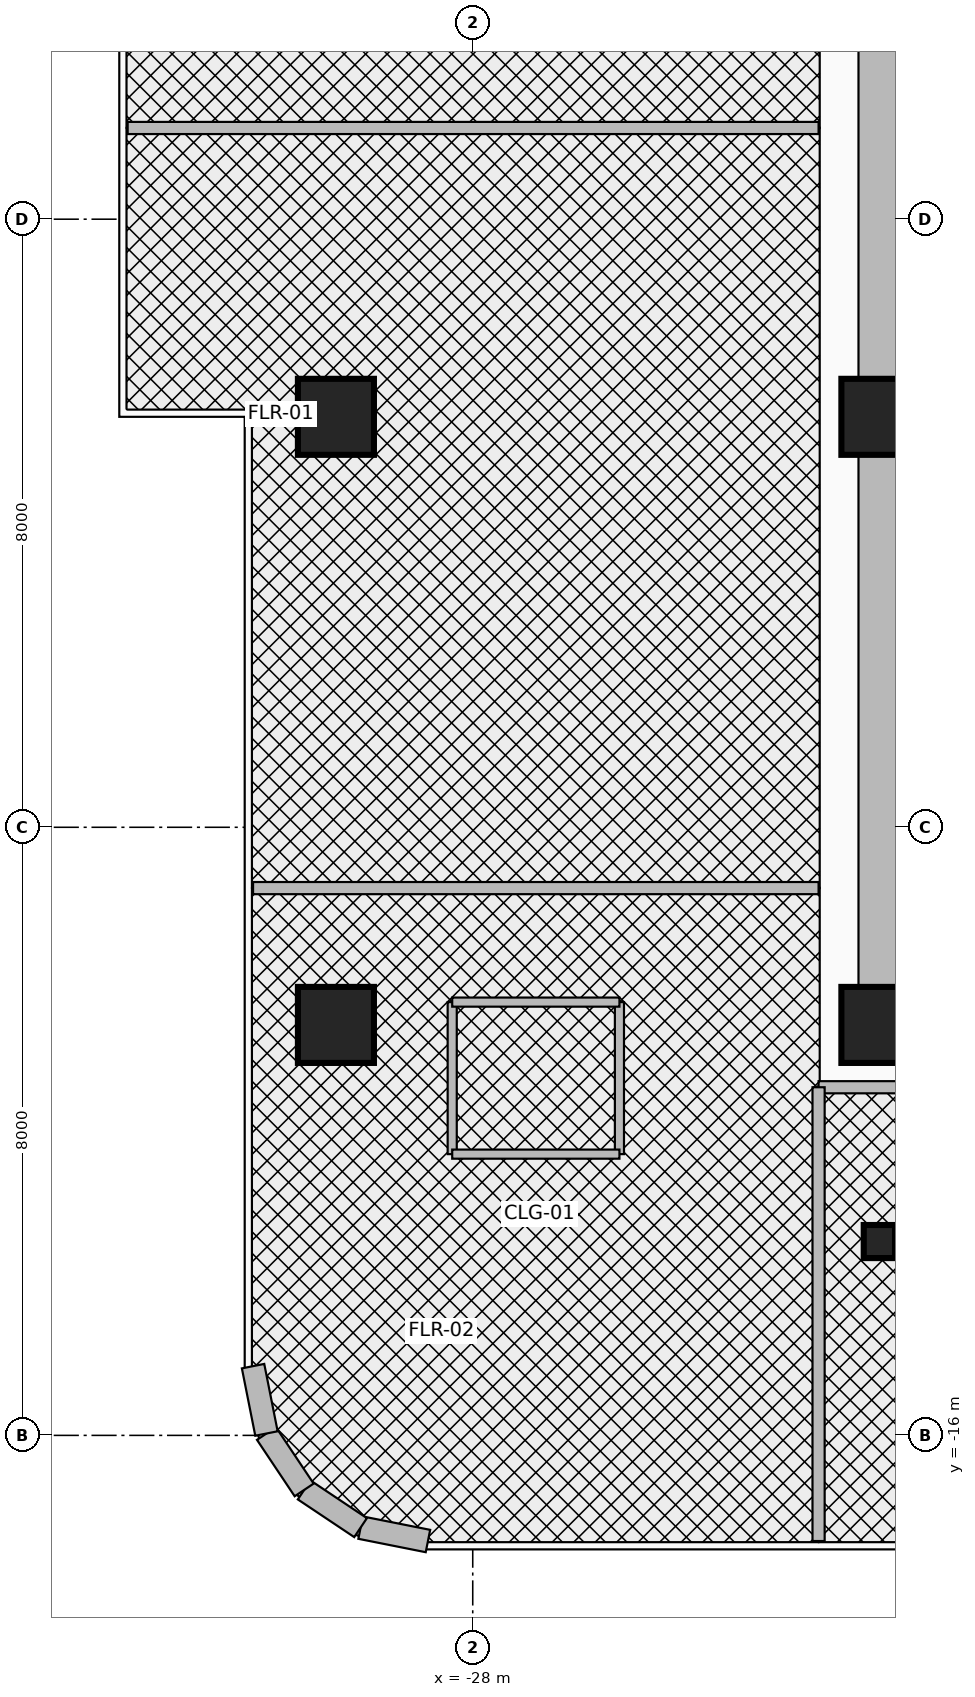
"""IFC4 building model, lengths in metres.
Left out: names, types, materials, properties, quantities, classifications, styles, units other than length and angle.
Written with IfcOpenShell. Run it as: python <this file> out.ifc"""

import sys

from ifc_helpers import new_model, si_unit, direction, frame, frame_2d, origin, origin_2d, place, context, subcontext, project, spatial, rectangle, i_section, extrude, source, transform, mapped, element, fill, save


model = new_model("IFC4")
c1 = context("Model", 3, precision=1e-05, world=origin(), true_north=direction((0.0, 1.0)))
c2 = subcontext(c1, "Body", "Model", "MODEL_VIEW")
j1 = project(units=[si_unit("LENGTHUNIT", "METRE"), si_unit("PLANEANGLEUNIT", "RADIAN")], contexts=[c1])
p1 = place(None, origin())
s1 = spatial("IfcSite", under=j1, at=p1, CompositionType="ELEMENT")
p2 = place(p1, origin())
s2 = spatial("IfcBuilding", under=s1, at=p2, CompositionType="ELEMENT")
p3 = place(p2, frame((0.0, 0.0, 172.3)))
s3 = spatial("IfcBuildingStorey", under=s2, at=p3, CompositionType="ELEMENT", Elevation=172.3)
p4 = place(p3, frame((-22.65, -11.075, 0.0), z_axis=(0.0, 0.0, 1.0), x_axis=(0.0, 1.0, 0.0)))
e1 = element("IfcWall", 1, at=p4, inside=s3, PredefinedType="SHEAR", context=c2, shape_type="SweptSolid", body=[
    extrude(rectangle(XDim=22.15, YDim=0.55, at=frame_2d((11.075, 0.0))), origin(), (0.0, 0.0, 1.0), 3.93),
])
p5 = place(p3, frame((-22.65, -10.8, 0.0), z_axis=(0.0, 0.0, 1.0), x_axis=(1.0, 0.0, 0.0)))
e2 = element("IfcWall", 2, at=p5, inside=s3, PredefinedType="SHEAR", context=c2, shape_type="SweptSolid", body=[
    extrude(rectangle(XDim=10.25, YDim=0.55, at=frame_2d((5.125, 0.0))), origin(), (0.0, 0.0, 1.0), 3.93),
])
m1 = source(origin(), c2, "Body", "SweptSolid", [
    extrude(rectangle(XDim=1.0, YDim=1.0, at=origin_2d()), origin(), (0.0, 0.0, 1.0), 4.25),
])
for number, where, z_axis, x_axis in (
    (3, (-29.8, -10.6, 0.0), (0.0, 0.0, 1.0), (1.0, 0.0, 0.0)),
    (4, (-22.65, -10.6, 0.0), (0.0, 0.0, 1.0), (1.0, 0.0, 0.0)),
    (5, (-29.8, -2.6, 0.0), (0.0, 0.0, 1.0), (1.0, 0.0, 0.0)),
    (6, (-22.65, -2.6, 0.0), (0.0, 0.0, 1.0), (1.0, 0.0, 0.0)),
):
    element("IfcColumn", number, at=place(p3, frame(where, z_axis=z_axis, x_axis=x_axis)), inside=s3, PredefinedType="COLUMN", context=c2, shape_type="MappedRepresentation", body=[
        mapped(m1, transform((0.0, 0.0, 0.0), x_axis=(1.0, 0.0, 0.0), y_axis=(0.0, 1.0, 0.0), z_axis=(0.0, 0.0, 1.0), scale=1.0)),
    ])
m2 = source(origin(), c2, "Body", "SweptSolid", [
    extrude(i_section(OverallWidth=0.412, OverallDepth=0.435, WebThickness=0.036, FlangeThickness=0.057, at=origin_2d()), origin(), (0.0, 0.0, 1.0), 4.25),
])
p6 = place(p3, frame((-22.65, -13.45, 0.0), z_axis=(0.0, 0.0, 1.0), x_axis=(1.0, 0.0, 0.0)))
e7 = element("IfcColumn", 7, at=p6, inside=s3, PredefinedType="COLUMN", context=c2, shape_type="MappedRepresentation", body=[
    mapped(m2, transform((0.0, 0.0, 0.0), x_axis=(1.0, 0.0, 0.0), y_axis=(0.0, 1.0, 0.0), z_axis=(0.0, 0.0, 1.0), scale=1.0)),
])
p7 = place(p3, frame((-28.589, -17.39, 0.0), z_axis=(0.0, 0.0, 1.0), x_axis=(-0.980798241101, 0.195025152871, 0.0)))
e8 = element("IfcWall", 8, at=p7, inside=s3, PredefinedType="SOLIDWALL", context=c2, shape_type="SweptSolid", body=[
    extrude(rectangle(XDim=0.904, YDim=0.3, at=frame_2d((0.452, 0.0))), origin(), (0.0, 0.0, 1.0), 3.93),
])
for number, where, z_axis, x_axis in (
    (9, (-29.476, -17.214, 0.0), (0.0, 0.0, 1.0), (-0.832, 0.556, 0.0)),
    (10, (-30.218, -16.718, 0.0), (0.0, 0.0, 1.0), (-0.556, 0.832, 0.0)),
):
    element("IfcWall", number, at=place(p3, frame(where, z_axis=z_axis, x_axis=x_axis)), inside=s3, PredefinedType="SOLIDWALL", context=c2, shape_type="SweptSolid", body=[
        extrude(rectangle(XDim=0.893, YDim=0.3, at=frame_2d((0.446, 0.0))), origin(), (0.0, 0.0, 1.0), 3.93),
    ])
p8 = place(p3, frame((-30.714, -15.976, 0.0), z_axis=(0.0, 0.0, 1.0), x_axis=(-0.195025152871, 0.980798241101, 0.0)))
e11 = element("IfcWall", 11, at=p8, inside=s3, PredefinedType="SOLIDWALL", context=c2, shape_type="SweptSolid", body=[
    extrude(rectangle(XDim=0.904, YDim=0.3, at=frame_2d((0.452, 0.0))), origin(), (0.0, 0.0, 1.0), 3.93),
])
p9 = place(p3, frame((-23.45, -11.42, 0.0), z_axis=(0.0, 0.0, 1.0), x_axis=(1.0, 0.0, 0.0)))
e12 = element("IfcWall", 12, at=p9, inside=s3, PredefinedType="PARTITIONING", context=c2, shape_type="SweptSolid", body=[
    extrude(rectangle(XDim=13.84, YDim=0.16, at=frame_2d((6.92, 0.0))), origin(), (0.0, 0.0, 1.0), 3.304),
])
p10 = place(p3, frame((-23.45, -17.39, 0.0), z_axis=(0.0, 0.0, 1.0), x_axis=(0.0, 1.0, 0.0)))
e13 = element("IfcWall", 13, at=p10, inside=s3, PredefinedType="PARTITIONING", context=c2, shape_type="SweptSolid", body=[
    extrude(rectangle(XDim=5.97, YDim=0.16, at=frame_2d((2.985, 0.0))), origin(), (0.0, 0.0, 1.0), 3.93),
])
p11 = place(p10, frame((2.535, 0.0, 0.0)))
e14 = element("IfcOpeningElement", 14, at=p11, cuts=e13, PredefinedType="OPENING", context=c2, shape_type="SweptSolid", body=[
    extrude(rectangle(XDim=0.9, YDim=2.1, at=frame_2d((0.45, 1.05))), frame((0.0, 0.095, 0.0), z_axis=(0.0, -1.0, 0.0), x_axis=(1.0, 0.0, 0.0)), (0.0, 0.0, 1.0), 0.19),
])
p12 = place(p3, frame((-30.89, -8.8, 0.0), z_axis=(0.0, 0.0, 1.0), x_axis=(1.0, 0.0, 0.0)))
e15 = element("IfcWall", 15, at=p12, inside=s3, PredefinedType="PARTITIONING", context=c2, shape_type="SweptSolid", body=[
    extrude(rectangle(XDim=7.44, YDim=0.16, at=frame_2d((3.72, 0.0))), origin(), (0.0, 0.0, 1.0), 3.376),
])
p13 = place(p12, frame((3.245, 0.0, 0.0)))
e16 = element("IfcOpeningElement", 16, at=p13, cuts=e15, PredefinedType="OPENING", context=c2, shape_type="SweptSolid", body=[
    extrude(rectangle(XDim=0.95, YDim=2.15, at=frame_2d((0.475, 1.075))), frame((0.0, 0.095, 0.0), z_axis=(0.0, -1.0, 0.0), x_axis=(1.0, 0.0, 0.0)), (0.0, 0.0, 1.0), 0.19),
])
for number, where, z_axis, x_axis in (
    (17, (-28.27, -12.3, 0.0), (0.0, 0.0, 1.0), (0.0, 1.0, 0.0)),
    (18, (-26.07, -12.3, 0.0), (0.0, 0.0, 1.0), (0.0, 1.0, 0.0)),
):
    element("IfcWall", number, at=place(p3, frame(where, z_axis=z_axis, x_axis=x_axis)), inside=s3, PredefinedType="PARTITIONING", context=c2, shape_type="SweptSolid", body=[
        extrude(rectangle(XDim=2.0, YDim=0.12, at=frame_2d((1.0, 0.0))), origin(), (0.0, 0.0, 1.0), 2.965),
    ])
p14 = place(p3, frame((-28.27, -12.3, 0.0), z_axis=(0.0, 0.0, 1.0), x_axis=(1.0, 0.0, 0.0)))
e19 = element("IfcWall", 19, at=p14, inside=s3, PredefinedType="PARTITIONING", context=c2, shape_type="SweptSolid", body=[
    extrude(rectangle(XDim=2.2, YDim=0.12, at=frame_2d((1.1, 0.0))), origin(), (0.0, 0.0, 1.0), 3.93),
])
p15 = place(p3, frame((-28.27, -10.3, 0.0), z_axis=(0.0, 0.0, 1.0), x_axis=(1.0, 0.0, 0.0)))
e20 = element("IfcWall", 20, at=p15, inside=s3, PredefinedType="PARTITIONING", context=c2, shape_type="SweptSolid", body=[
    extrude(rectangle(XDim=2.2, YDim=0.12, at=frame_2d((1.1, 0.0))), origin(), (0.0, 0.0, 1.0), 3.93),
])
p16 = place(p15, frame((0.675, 0.0, 0.0)))
e21 = element("IfcOpeningElement", 21, at=p16, cuts=e20, PredefinedType="OPENING", context=c2, shape_type="SweptSolid", body=[
    extrude(rectangle(XDim=0.85, YDim=2.1, at=frame_2d((0.425, 1.05))), frame((0.0, 0.075, 0.0), z_axis=(0.0, -1.0, 0.0), x_axis=(1.0, 0.0, 0.0)), (0.0, 0.0, 1.0), 0.15),
])
p17 = place(p3, frame((-32.54, 1.2, 0.0), z_axis=(0.0, 0.0, 1.0), x_axis=(1.0, 0.0, 0.0)))
e22 = element("IfcWall", 22, at=p17, inside=s3, PredefinedType="PARTITIONING", context=c2, shape_type="SweptSolid", body=[
    extrude(rectangle(XDim=9.09, YDim=0.16, at=frame_2d((4.545, 0.0))), origin(), (0.0, 0.0, 1.0), 3.376),
])
p18 = place(p17, frame((3.2, 0.0, 0.0)))
e23 = element("IfcOpeningElement", 23, at=p18, cuts=e22, PredefinedType="OPENING", context=c2, shape_type="SweptSolid", body=[
    extrude(rectangle(XDim=1.8, YDim=2.15, at=frame_2d((0.9, 1.075))), frame((0.0, 0.095, 0.0), z_axis=(0.0, -1.0, 0.0), x_axis=(1.0, 0.0, 0.0)), (0.0, 0.0, 1.0), 0.19),
])
p19 = place(p13, origin())
e24 = element("IfcDoor", 24, at=p19, inside=s3, OperationType="SINGLE_SWING_RIGHT", PredefinedType="DOOR", context=c2, shape_type="SweptSolid", body=[
    extrude(rectangle(XDim=0.95, YDim=2.15, at=frame_2d((0.475, 1.075))), frame((0.0, 0.025, 0.0), z_axis=(0.0, -1.0, 0.0), x_axis=(1.0, 0.0, 0.0)), (0.0, 0.0, 1.0), 0.05),
])
fill(e16, e24)
p20 = place(p16, origin())
e25 = element("IfcDoor", 25, at=p20, inside=s3, OperationType="SINGLE_SWING_LEFT", PredefinedType="DOOR", context=c2, shape_type="SweptSolid", body=[
    extrude(rectangle(XDim=0.85, YDim=2.1, at=frame_2d((0.425, 1.05))), frame((0.0, 0.025, 0.0), z_axis=(0.0, -1.0, 0.0), x_axis=(1.0, 0.0, 0.0)), (0.0, 0.0, 1.0), 0.05),
])
fill(e21, e25)
p21 = place(p18, origin())
e26 = element("IfcDoor", 26, at=p21, inside=s3, OperationType="DOUBLE_DOOR_SINGLE_SWING", PredefinedType="DOOR", context=c2, shape_type="SweptSolid", body=[
    extrude(rectangle(XDim=1.8, YDim=2.15, at=frame_2d((0.9, 1.075))), frame((0.0, 0.025, 0.0), z_axis=(0.0, -1.0, 0.0), x_axis=(1.0, 0.0, 0.0)), (0.0, 0.0, 1.0), 0.05),
])
fill(e23, e26)
p22 = place(p11, frame((0.9, 0.0, 0.0), z_axis=(0.0, 0.0, 1.0), x_axis=(-1.0, 0.0, 0.0)))
e27 = element("IfcDoor", 27, at=p22, inside=s3, OperationType="SINGLE_SWING_LEFT", PredefinedType="DOOR", context=c2, shape_type="SweptSolid", body=[
    extrude(rectangle(XDim=0.9, YDim=2.1, at=frame_2d((0.45, 1.05))), frame((0.0, 0.025, 0.0), z_axis=(0.0, -1.0, 0.0), x_axis=(1.0, 0.0, 0.0)), (0.0, 0.0, 1.0), 0.05),
])
fill(e14, e27)
save(model, sys.argv[1])
